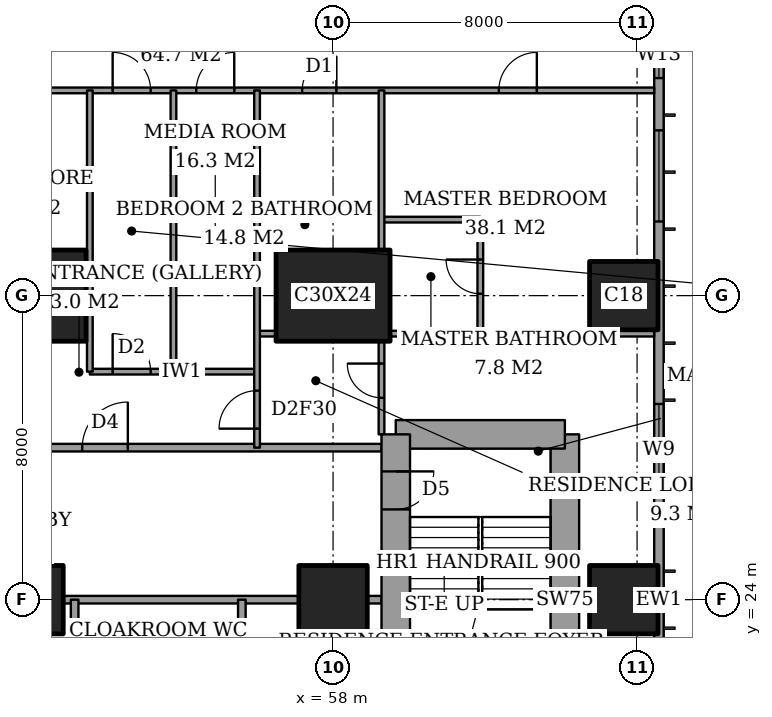
"""IFC4 building model, lengths in metres.
Left out: names, types, materials, properties, quantities, classifications, styles, units other than length and angle.
Written with IfcOpenShell. Run it as: python <this file> out.ifc"""

import sys

from ifc_helpers import new_model, si_unit, direction, frame, frame_2d, origin, origin_2d, place, context, subcontext, project, spatial, rectangle, extrude, element, fill, save


model = new_model("IFC4")
c1 = context("Model", 3, precision=1e-05, world=origin(), true_north=direction((0.0, 1.0)))
c2 = subcontext(c1, "Body", "Model", "MODEL_VIEW")
j1 = project(units=[si_unit("LENGTHUNIT", "METRE"), si_unit("PLANEANGLEUNIT", "RADIAN")], contexts=[c1])
p1 = place(None, origin())
s1 = spatial("IfcSite", under=j1, at=p1, CompositionType="ELEMENT")
p2 = place(p1, origin())
s2 = spatial("IfcBuilding", under=s1, at=p2, CompositionType="ELEMENT")
p3 = place(p2, frame((0.0, 0.0, 189.4)))
s3 = spatial("IfcBuildingStorey", under=s2, at=p3, CompositionType="ELEMENT", Elevation=189.4)
p4 = place(p3, frame((50.0, 24.0, 0.0), z_axis=(0.0, 0.0, 1.0), x_axis=(1.0, 0.0, 0.0)))
e1 = element("IfcColumn", 1, at=p4, inside=s3, PredefinedType="COLUMN", context=c2, shape_type="SweptSolid", body=[
    extrude(rectangle(XDim=1.8, YDim=1.8, at=origin_2d()), origin(), (0.0, 0.0, 1.0), 3.6),
])
p5 = place(p3, frame((50.0, 32.0, 0.0), z_axis=(0.0, 0.0, 1.0), x_axis=(1.0, 0.0, 0.0)))
e2 = element("IfcColumn", 2, at=p5, inside=s3, PredefinedType="COLUMN", context=c2, shape_type="SweptSolid", body=[
    extrude(rectangle(XDim=3.0, YDim=2.4, at=origin_2d()), origin(), (0.0, 0.0, 1.0), 3.6),
])
p6 = place(p3, frame((58.0, 24.0, 0.0), z_axis=(0.0, 0.0, 1.0), x_axis=(1.0, 0.0, 0.0)))
e3 = element("IfcColumn", 3, at=p6, inside=s3, PredefinedType="COLUMN", context=c2, shape_type="SweptSolid", body=[
    extrude(rectangle(XDim=1.8, YDim=1.8, at=origin_2d()), origin(), (0.0, 0.0, 1.0), 3.6),
])
p7 = place(p3, frame((58.0, 32.0, 0.0), z_axis=(0.0, 0.0, 1.0), x_axis=(1.0, 0.0, 0.0)))
e4 = element("IfcColumn", 4, at=p7, inside=s3, PredefinedType="COLUMN", context=c2, shape_type="SweptSolid", body=[
    extrude(rectangle(XDim=3.0, YDim=2.4, at=origin_2d()), origin(), (0.0, 0.0, 1.0), 3.6),
])
for number, where, z_axis, x_axis in (
    (5, (65.65, 24.0, 0.0), (0.0, 0.0, 1.0), (1.0, 0.0, 0.0)),
    (6, (65.65, 32.0, 0.0), (0.0, 0.0, 1.0), (1.0, 0.0, 0.0)),
):
    element("IfcColumn", number, at=place(p3, frame(where, z_axis=z_axis, x_axis=x_axis)), inside=s3, PredefinedType="COLUMN", context=c2, shape_type="SweptSolid", body=[
        extrude(rectangle(XDim=1.8, YDim=1.8, at=origin_2d()), origin(), (0.0, 0.0, 1.0), 3.6),
    ])
p8 = place(p3, frame((64.1, 19.65, 0.0), z_axis=(0.0, 0.0, 1.0), x_axis=(0.0, 1.0, 0.0)))
e7 = element("IfcWall", 7, at=p8, inside=s3, PredefinedType="SHEAR", context=c2, shape_type="SweptSolid", body=[
    extrude(rectangle(XDim=8.7, YDim=0.75, at=frame_2d((4.35, 0.0))), origin(), (0.0, 0.0, 1.0), 3.6),
])
p9 = place(p3, frame((64.1, 28.35, 0.0), z_axis=(0.0, 0.0, 1.0), x_axis=(-1.0, 0.0, 0.0)))
e8 = element("IfcWall", 8, at=p9, inside=s3, PredefinedType="SHEAR", context=c2, shape_type="SweptSolid", body=[
    extrude(rectangle(XDim=4.45, YDim=0.75, at=frame_2d((2.225, 0.0))), origin(), (0.0, 0.0, 1.0), 3.6),
])
p10 = place(p3, frame((59.65, 28.35, 0.0), z_axis=(0.0, 0.0, 1.0), x_axis=(0.0, -1.0, 0.0)))
e9 = element("IfcWall", 9, at=p10, inside=s3, PredefinedType="SHEAR", context=c2, shape_type="SweptSolid", body=[
    extrude(rectangle(XDim=8.7, YDim=0.75, at=frame_2d((4.35, 0.0))), origin(), (0.0, 0.0, 1.0), 3.6),
])
p11 = place(p10, frame((0.975, 0.0, 0.0)))
e10 = element("IfcOpeningElement", 10, at=p11, cuts=e9, PredefinedType="OPENING", context=c2, shape_type="SweptSolid", body=[
    extrude(rectangle(XDim=1.0, YDim=2.1, at=frame_2d((0.5, 1.05))), frame((0.0, 0.385, 0.0), z_axis=(0.0, -1.0, 0.0), x_axis=(1.0, 0.0, 0.0)), (0.0, 0.0, 1.0), 0.77),
])
p12 = place(p3, frame((66.575, 3.175, 0.0), z_axis=(0.0, 0.0, 1.0), x_axis=(0.0, 1.0, 0.0)))
e11 = element("IfcWall", 11, at=p12, inside=s3, PredefinedType="SOLIDWALL", context=c2, shape_type="SweptSolid", body=[
    extrude(rectangle(XDim=41.65, YDim=0.25, at=frame_2d((20.825, 0.0))), origin(), (0.0, 0.0, 1.0), 3.6),
])
p13 = place(p12, frame((0.825, 0.0, 0.2)))
e12 = element("IfcOpeningElement", 12, at=p13, cuts=e11, PredefinedType="OPENING", context=c2, shape_type="SweptSolid", body=[
    extrude(rectangle(XDim=2.4, YDim=2.4, at=frame_2d((1.2, 1.2))), frame((0.0, 0.135, 0.0), z_axis=(0.0, -1.0, 0.0), x_axis=(1.0, 0.0, 0.0)), (0.0, 0.0, 1.0), 0.27),
])
p14 = place(p12, frame((6.6, 0.0, 0.2)))
e13 = element("IfcOpeningElement", 13, at=p14, cuts=e11, PredefinedType="OPENING", context=c2, shape_type="SweptSolid", body=[
    extrude(rectangle(XDim=1.2, YDim=2.4, at=frame_2d((0.6, 1.2))), frame((0.0, 0.135, 0.0), z_axis=(0.0, -1.0, 0.0), x_axis=(1.0, 0.0, 0.0)), (0.0, 0.0, 1.0), 0.27),
])
p15 = place(p12, frame((8.775, 0.0, 0.2)))
e14 = element("IfcOpeningElement", 14, at=p15, cuts=e11, PredefinedType="OPENING", context=c2, shape_type="SweptSolid", body=[
    extrude(rectangle(XDim=2.4, YDim=2.4, at=frame_2d((1.2, 1.2))), frame((0.0, 0.135, 0.0), z_axis=(0.0, -1.0, 0.0), x_axis=(1.0, 0.0, 0.0)), (0.0, 0.0, 1.0), 0.27),
])
p16 = place(p12, frame((15.675, 0.0, 0.2)))
e15 = element("IfcOpeningElement", 15, at=p16, cuts=e11, PredefinedType="OPENING", context=c2, shape_type="SweptSolid", body=[
    extrude(rectangle(XDim=2.4, YDim=2.4, at=frame_2d((1.2, 1.2))), frame((0.0, 0.135, 0.0), z_axis=(0.0, -1.0, 0.0), x_axis=(1.0, 0.0, 0.0)), (0.0, 0.0, 1.0), 0.27),
])
p17 = place(p12, frame((23.575, 0.0, 0.2)))
e16 = element("IfcOpeningElement", 16, at=p17, cuts=e11, PredefinedType="OPENING", context=c2, shape_type="SweptSolid", body=[
    extrude(rectangle(XDim=2.4, YDim=2.4, at=frame_2d((1.2, 1.2))), frame((0.0, 0.135, 0.0), z_axis=(0.0, -1.0, 0.0), x_axis=(1.0, 0.0, 0.0)), (0.0, 0.0, 1.0), 0.27),
])
p18 = place(p12, frame((30.775, 0.0, 0.2)))
e17 = element("IfcOpeningElement", 17, at=p18, cuts=e11, PredefinedType="OPENING", context=c2, shape_type="SweptSolid", body=[
    extrude(rectangle(XDim=2.4, YDim=2.4, at=frame_2d((1.2, 1.2))), frame((0.0, 0.135, 0.0), z_axis=(0.0, -1.0, 0.0), x_axis=(1.0, 0.0, 0.0)), (0.0, 0.0, 1.0), 0.27),
])
p19 = place(p12, frame((34.55, 0.0, 0.2)))
e18 = element("IfcOpeningElement", 18, at=p19, cuts=e11, PredefinedType="OPENING", context=c2, shape_type="SweptSolid", body=[
    extrude(rectangle(XDim=1.2, YDim=2.4, at=frame_2d((0.6, 1.2))), frame((0.0, 0.135, 0.0), z_axis=(0.0, -1.0, 0.0), x_axis=(1.0, 0.0, 0.0)), (0.0, 0.0, 1.0), 0.27),
])
p20 = place(p12, frame((38.425, 0.0, 0.2)))
e19 = element("IfcOpeningElement", 19, at=p20, cuts=e11, PredefinedType="OPENING", context=c2, shape_type="SweptSolid", body=[
    extrude(rectangle(XDim=2.4, YDim=2.4, at=frame_2d((1.2, 1.2))), frame((0.0, 0.135, 0.0), z_axis=(0.0, -1.0, 0.0), x_axis=(1.0, 0.0, 0.0)), (0.0, 0.0, 1.0), 0.27),
])
p21 = place(p3, frame((50.9, 24.0, 0.0), z_axis=(0.0, 0.0, 1.0), x_axis=(1.0, 0.0, 0.0)))
e20 = element("IfcWall", 20, at=p21, inside=s3, PredefinedType="PARTITIONING", context=c2, shape_type="SweptSolid", body=[
    extrude(rectangle(XDim=6.2, YDim=0.2, at=frame_2d((3.1, 0.0))), origin(), (0.0, 0.0, 1.0), 3.35),
])
p22 = place(p3, frame((58.9, 24.0, 0.0), z_axis=(0.0, 0.0, 1.0), x_axis=(1.0, 0.0, 0.0)))
e21 = element("IfcWall", 21, at=p22, inside=s3, PredefinedType="PARTITIONING", context=c2, shape_type="SweptSolid", body=[
    extrude(rectangle(XDim=0.375, YDim=0.2, at=frame_2d((0.188, 0.0))), origin(), (0.0, 0.0, 1.0), 3.35),
])
p23 = place(p3, frame((42.0, 28.0, 0.0), z_axis=(0.0, 0.0, 1.0), x_axis=(1.0, 0.0, 0.0)))
e22 = element("IfcWall", 22, at=p23, inside=s3, PredefinedType="PARTITIONING", context=c2, shape_type="SweptSolid", body=[
    extrude(rectangle(XDim=17.275, YDim=0.2, at=frame_2d((8.637, 0.0))), origin(), (0.0, 0.0, 1.0), 3.35),
])
p24 = place(p23, frame((9.4, 0.0, 0.0)))
e23 = element("IfcOpeningElement", 23, at=p24, cuts=e22, PredefinedType="OPENING", context=c2, shape_type="SweptSolid", body=[
    extrude(rectangle(XDim=1.2, YDim=2.4, at=frame_2d((0.6, 1.2))), frame((0.0, 0.11, 0.0), z_axis=(0.0, -1.0, 0.0), x_axis=(1.0, 0.0, 0.0)), (0.0, 0.0, 1.0), 0.22),
])
p25 = place(p3, frame((51.6, 30.0, 0.0), z_axis=(0.0, 0.0, 1.0), x_axis=(1.0, 0.0, 0.0)))
e24 = element("IfcWall", 24, at=p25, inside=s3, PredefinedType="PARTITIONING", context=c2, shape_type="SweptSolid", body=[
    extrude(rectangle(XDim=4.4, YDim=0.15, at=frame_2d((2.2, 0.0))), origin(), (0.0, 0.0, 1.0), 3.35),
])
p26 = place(p25, frame((0.6, 0.0, 0.0)))
e25 = element("IfcOpeningElement", 25, at=p26, cuts=e24, PredefinedType="OPENING", context=c2, shape_type="SweptSolid", body=[
    extrude(rectangle(XDim=1.0, YDim=2.1, at=frame_2d((0.5, 1.05))), frame((0.0, 0.085, 0.0), z_axis=(0.0, -1.0, 0.0), x_axis=(1.0, 0.0, 0.0)), (0.0, 0.0, 1.0), 0.17),
])
p27 = place(p3, frame((56.0, 31.0, 0.0), z_axis=(0.0, 0.0, 1.0), x_axis=(1.0, 0.0, 0.0)))
e26 = element("IfcWall", 26, at=p27, inside=s3, PredefinedType="PARTITIONING", context=c2, shape_type="SweptSolid", body=[
    extrude(rectangle(XDim=0.5, YDim=0.15, at=frame_2d((0.25, 0.0))), origin(), (0.0, 0.0, 1.0), 3.35),
])
p28 = place(p3, frame((59.5, 31.0, 0.0), z_axis=(0.0, 0.0, 1.0), x_axis=(1.0, 0.0, 0.0)))
e27 = element("IfcWall", 27, at=p28, inside=s3, PredefinedType="PARTITIONING", context=c2, shape_type="SweptSolid", body=[
    extrude(rectangle(XDim=6.95, YDim=0.15, at=frame_2d((3.475, 0.0))), origin(), (0.0, 0.0, 1.0), 3.35),
])
p29 = place(p3, frame((59.275, 34.0, 0.0), z_axis=(0.0, 0.0, 1.0), x_axis=(1.0, 0.0, 0.0)))
e28 = element("IfcWall", 28, at=p29, inside=s3, PredefinedType="PARTITIONING", context=c2, shape_type="SweptSolid", body=[
    extrude(rectangle(XDim=2.6, YDim=0.15, at=frame_2d((1.3, 0.0))), origin(), (0.0, 0.0, 1.0), 3.35),
])
p30 = place(p3, frame((41.439, 37.4, 0.0), z_axis=(0.0, 0.0, 1.0), x_axis=(1.0, 0.0, 0.0)))
e29 = element("IfcWall", 29, at=p30, inside=s3, PredefinedType="PARTITIONING", context=c2, shape_type="SweptSolid", body=[
    extrude(rectangle(XDim=25.011, YDim=0.15, at=frame_2d((12.505, 0.0))), origin(), (0.0, 0.0, 1.0), 3.35),
])
p31 = place(p30, frame((10.761, 0.0, 0.0)))
e30 = element("IfcOpeningElement", 30, at=p31, cuts=e29, PredefinedType="OPENING", context=c2, shape_type="SweptSolid", body=[
    extrude(rectangle(XDim=1.0, YDim=2.1, at=frame_2d((0.5, 1.05))), frame((0.0, 0.085, 0.0), z_axis=(0.0, -1.0, 0.0), x_axis=(1.0, 0.0, 0.0)), (0.0, 0.0, 1.0), 0.17),
])
p32 = place(p30, frame((20.924, 0.0, 0.0)))
e31 = element("IfcOpeningElement", 31, at=p32, cuts=e29, PredefinedType="OPENING", context=c2, shape_type="SweptSolid", body=[
    extrude(rectangle(XDim=1.0, YDim=2.1, at=frame_2d((0.5, 1.05))), frame((0.0, 0.085, 0.0), z_axis=(0.0, -1.0, 0.0), x_axis=(1.0, 0.0, 0.0)), (0.0, 0.0, 1.0), 0.17),
])
p33 = place(p30, frame((15.749, 0.0, 0.0)))
e32 = element("IfcOpeningElement", 32, at=p33, cuts=e29, PredefinedType="OPENING", context=c2, shape_type="SweptSolid", body=[
    extrude(rectangle(XDim=0.9, YDim=2.1, at=frame_2d((0.45, 1.05))), frame((0.0, 0.085, 0.0), z_axis=(0.0, -1.0, 0.0), x_axis=(1.0, 0.0, 0.0)), (0.0, 0.0, 1.0), 0.17),
])
p34 = place(p30, frame((12.961, 0.0, 0.0)))
e33 = element("IfcOpeningElement", 33, at=p34, cuts=e29, PredefinedType="OPENING", context=c2, shape_type="SweptSolid", body=[
    extrude(rectangle(XDim=1.0, YDim=2.1, at=frame_2d((0.5, 1.05))), frame((0.0, 0.085, 0.0), z_axis=(0.0, -1.0, 0.0), x_axis=(1.0, 0.0, 0.0)), (0.0, 0.0, 1.0), 0.17),
])
p35 = place(p30, frame((7.911, 0.0, 0.0)))
e34 = element("IfcOpeningElement", 34, at=p35, cuts=e29, PredefinedType="OPENING", context=c2, shape_type="SweptSolid", body=[
    extrude(rectangle(XDim=0.9, YDim=2.1, at=frame_2d((0.45, 1.05))), frame((0.0, 0.085, 0.0), z_axis=(0.0, -1.0, 0.0), x_axis=(1.0, 0.0, 0.0)), (0.0, 0.0, 1.0), 0.17),
])
p36 = place(p30, frame((2.836, 0.0, 0.0)))
e35 = element("IfcOpeningElement", 35, at=p36, cuts=e29, PredefinedType="OPENING", context=c2, shape_type="SweptSolid", body=[
    extrude(rectangle(XDim=1.0, YDim=2.1, at=frame_2d((0.5, 1.05))), frame((0.0, 0.085, 0.0), z_axis=(0.0, -1.0, 0.0), x_axis=(1.0, 0.0, 0.0)), (0.0, 0.0, 1.0), 0.17),
])
p37 = place(p3, frame((51.2, 21.6, 0.0), z_axis=(0.0, 0.0, 1.0), x_axis=(0.0, 1.0, 0.0)))
e36 = element("IfcWall", 36, at=p37, inside=s3, PredefinedType="PARTITIONING", context=c2, shape_type="SweptSolid", body=[
    extrude(rectangle(XDim=2.4, YDim=0.2, at=frame_2d((1.2, 0.0))), origin(), (0.0, 0.0, 1.0), 3.35),
])
for number, where, z_axis, x_axis in (
    (37, (51.6, 30.0, 0.0), (0.0, 0.0, 1.0), (0.0, 1.0, 0.0)),
    (38, (53.8, 30.0, 0.0), (0.0, 0.0, 1.0), (0.0, 1.0, 0.0)),
):
    element("IfcWall", number, at=place(p3, frame(where, z_axis=z_axis, x_axis=x_axis)), inside=s3, PredefinedType="PARTITIONING", context=c2, shape_type="SweptSolid", body=[
        extrude(rectangle(XDim=7.4, YDim=0.15, at=frame_2d((3.7, 0.0))), origin(), (0.0, 0.0, 1.0), 3.35),
    ])
p38 = place(p3, frame((55.6, 21.6, 0.0), z_axis=(0.0, 0.0, 1.0), x_axis=(0.0, 1.0, 0.0)))
e39 = element("IfcWall", 39, at=p38, inside=s3, PredefinedType="PARTITIONING", context=c2, shape_type="SweptSolid", body=[
    extrude(rectangle(XDim=2.4, YDim=0.2, at=frame_2d((1.2, 0.0))), origin(), (0.0, 0.0, 1.0), 3.35),
])
p39 = place(p3, frame((56.0, 28.0, 0.0), z_axis=(0.0, 0.0, 1.0), x_axis=(0.0, 1.0, 0.0)))
e40 = element("IfcWall", 40, at=p39, inside=s3, PredefinedType="PARTITIONING", context=c2, shape_type="SweptSolid", body=[
    extrude(rectangle(XDim=9.4, YDim=0.15, at=frame_2d((4.7, 0.0))), origin(), (0.0, 0.0, 1.0), 3.35),
])
p40 = place(p39, frame((0.5, 0.0, 0.0)))
e41 = element("IfcOpeningElement", 41, at=p40, cuts=e40, PredefinedType="OPENING", context=c2, shape_type="SweptSolid", body=[
    extrude(rectangle(XDim=1.0, YDim=2.1, at=frame_2d((0.5, 1.05))), frame((0.0, 0.085, 0.0), z_axis=(0.0, -1.0, 0.0), x_axis=(1.0, 0.0, 0.0)), (0.0, 0.0, 1.0), 0.17),
])
p41 = place(p3, frame((59.275, 28.35, 0.0), z_axis=(0.0, 0.0, 1.0), x_axis=(0.0, 1.0, 0.0)))
e42 = element("IfcWall", 42, at=p41, inside=s3, PredefinedType="PARTITIONING", context=c2, shape_type="SweptSolid", body=[
    extrude(rectangle(XDim=2.45, YDim=0.15, at=frame_2d((1.225, 0.0))), origin(), (0.0, 0.0, 1.0), 3.35),
])
p42 = place(p41, frame((0.962, 0.0, 0.0)))
e43 = element("IfcOpeningElement", 43, at=p42, cuts=e42, PredefinedType="OPENING", context=c2, shape_type="SweptSolid", body=[
    extrude(rectangle(XDim=0.9, YDim=2.1, at=frame_2d((0.45, 1.05))), frame((0.0, 0.085, 0.0), z_axis=(0.0, -1.0, 0.0), x_axis=(1.0, 0.0, 0.0)), (0.0, 0.0, 1.0), 0.17),
])
p43 = place(p3, frame((59.275, 33.2, 0.0), z_axis=(0.0, 0.0, 1.0), x_axis=(0.0, 1.0, 0.0)))
e44 = element("IfcWall", 44, at=p43, inside=s3, PredefinedType="PARTITIONING", context=c2, shape_type="SweptSolid", body=[
    extrude(rectangle(XDim=4.2, YDim=0.15, at=frame_2d((2.1, 0.0))), origin(), (0.0, 0.0, 1.0), 3.35),
])
p44 = place(p3, frame((61.875, 31.0, 0.0), z_axis=(0.0, 0.0, 1.0), x_axis=(0.0, 1.0, 0.0)))
e45 = element("IfcWall", 45, at=p44, inside=s3, PredefinedType="PARTITIONING", context=c2, shape_type="SweptSolid", body=[
    extrude(rectangle(XDim=3.0, YDim=0.15, at=frame_2d((1.5, 0.0))), origin(), (0.0, 0.0, 1.0), 3.35),
])
p45 = place(p44, frame((1.05, 0.0, 0.0)))
e46 = element("IfcOpeningElement", 46, at=p45, cuts=e45, PredefinedType="OPENING", context=c2, shape_type="SweptSolid", body=[
    extrude(rectangle(XDim=0.9, YDim=2.1, at=frame_2d((0.45, 1.05))), frame((0.0, 0.085, 0.0), z_axis=(0.0, -1.0, 0.0), x_axis=(1.0, 0.0, 0.0)), (0.0, 0.0, 1.0), 0.17),
])
p46 = place(p17, origin())
e47 = element("IfcWindow", 47, at=p46, inside=s3, PartitioningType="SINGLE_PANEL", PredefinedType="WINDOW", context=c2, shape_type="SweptSolid", body=[
    extrude(rectangle(XDim=2.4, YDim=2.4, at=frame_2d((1.2, 1.2))), frame((0.0, 0.03, 0.0), z_axis=(0.0, -1.0, 0.0), x_axis=(1.0, 0.0, 0.0)), (0.0, 0.0, 1.0), 0.06),
])
fill(e16, e47)
p47 = place(p18, origin())
e48 = element("IfcWindow", 48, at=p47, inside=s3, PartitioningType="SINGLE_PANEL", PredefinedType="WINDOW", context=c2, shape_type="SweptSolid", body=[
    extrude(rectangle(XDim=2.4, YDim=2.4, at=frame_2d((1.2, 1.2))), frame((0.0, 0.03, 0.0), z_axis=(0.0, -1.0, 0.0), x_axis=(1.0, 0.0, 0.0)), (0.0, 0.0, 1.0), 0.06),
])
fill(e17, e48)
p48 = place(p19, origin())
e49 = element("IfcWindow", 49, at=p48, inside=s3, PartitioningType="SINGLE_PANEL", PredefinedType="WINDOW", context=c2, shape_type="SweptSolid", body=[
    extrude(rectangle(XDim=1.2, YDim=2.4, at=frame_2d((0.6, 1.2))), frame((0.0, 0.03, 0.0), z_axis=(0.0, -1.0, 0.0), x_axis=(1.0, 0.0, 0.0)), (0.0, 0.0, 1.0), 0.06),
])
fill(e18, e49)
p49 = place(p31, origin())
e50 = element("IfcDoor", 50, at=p49, inside=s3, OperationType="SINGLE_SWING_RIGHT", PredefinedType="DOOR", context=c2, shape_type="SweptSolid", body=[
    extrude(rectangle(XDim=1.0, YDim=2.1, at=frame_2d((0.5, 1.05))), frame((0.0, 0.025, 0.0), z_axis=(0.0, -1.0, 0.0), x_axis=(1.0, 0.0, 0.0)), (0.0, 0.0, 1.0), 0.05),
])
fill(e30, e50)
p50 = place(p45, origin())
e51 = element("IfcDoor", 51, at=p50, inside=s3, OperationType="SINGLE_SWING_LEFT", PredefinedType="DOOR", context=c2, shape_type="SweptSolid", body=[
    extrude(rectangle(XDim=0.9, YDim=2.1, at=frame_2d((0.45, 1.05))), frame((0.0, 0.025, 0.0), z_axis=(0.0, -1.0, 0.0), x_axis=(1.0, 0.0, 0.0)), (0.0, 0.0, 1.0), 0.05),
])
fill(e46, e51)
p51 = place(p32, origin())
e52 = element("IfcDoor", 52, at=p51, inside=s3, OperationType="SINGLE_SWING_LEFT", PredefinedType="DOOR", context=c2, shape_type="SweptSolid", body=[
    extrude(rectangle(XDim=1.0, YDim=2.1, at=frame_2d((0.5, 1.05))), frame((0.0, 0.025, 0.0), z_axis=(0.0, -1.0, 0.0), x_axis=(1.0, 0.0, 0.0)), (0.0, 0.0, 1.0), 0.05),
])
fill(e31, e52)
p52 = place(p42, origin())
e53 = element("IfcDoor", 53, at=p52, inside=s3, OperationType="SINGLE_SWING_LEFT", PredefinedType="DOOR", context=c2, shape_type="SweptSolid", body=[
    extrude(rectangle(XDim=0.9, YDim=2.1, at=frame_2d((0.45, 1.05))), frame((0.0, 0.025, 0.0), z_axis=(0.0, -1.0, 0.0), x_axis=(1.0, 0.0, 0.0)), (0.0, 0.0, 1.0), 0.05),
])
fill(e43, e53)
p53 = place(p33, origin())
e54 = element("IfcDoor", 54, at=p53, inside=s3, OperationType="SINGLE_SWING_LEFT", PredefinedType="DOOR", context=c2, shape_type="SweptSolid", body=[
    extrude(rectangle(XDim=0.9, YDim=2.1, at=frame_2d((0.45, 1.05))), frame((0.0, 0.025, 0.0), z_axis=(0.0, -1.0, 0.0), x_axis=(1.0, 0.0, 0.0)), (0.0, 0.0, 1.0), 0.05),
])
fill(e32, e54)
p54 = place(p40, origin())
e55 = element("IfcDoor", 55, at=p54, inside=s3, OperationType="SINGLE_SWING_RIGHT", PredefinedType="DOOR", context=c2, shape_type="SweptSolid", body=[
    extrude(rectangle(XDim=1.0, YDim=2.1, at=frame_2d((0.5, 1.05))), frame((0.0, 0.025, 0.0), z_axis=(0.0, -1.0, 0.0), x_axis=(1.0, 0.0, 0.0)), (0.0, 0.0, 1.0), 0.05),
])
fill(e41, e55)
p55 = place(p24, origin())
e56 = element("IfcDoor", 56, at=p55, inside=s3, OperationType="SINGLE_SWING_LEFT", PredefinedType="DOOR", context=c2, shape_type="SweptSolid", body=[
    extrude(rectangle(XDim=1.2, YDim=2.4, at=frame_2d((0.6, 1.2))), frame((0.0, 0.025, 0.0), z_axis=(0.0, -1.0, 0.0), x_axis=(1.0, 0.0, 0.0)), (0.0, 0.0, 1.0), 0.05),
])
fill(e23, e56)
p56 = place(p34, origin())
e57 = element("IfcDoor", 57, at=p56, inside=s3, OperationType="SINGLE_SWING_LEFT", PredefinedType="DOOR", context=c2, shape_type="SweptSolid", body=[
    extrude(rectangle(XDim=1.0, YDim=2.1, at=frame_2d((0.5, 1.05))), frame((0.0, 0.025, 0.0), z_axis=(0.0, -1.0, 0.0), x_axis=(1.0, 0.0, 0.0)), (0.0, 0.0, 1.0), 0.05),
])
fill(e33, e57)
p57 = place(p26, origin())
e58 = element("IfcDoor", 58, at=p57, inside=s3, OperationType="SINGLE_SWING_RIGHT", PredefinedType="DOOR", context=c2, shape_type="SweptSolid", body=[
    extrude(rectangle(XDim=1.0, YDim=2.1, at=frame_2d((0.5, 1.05))), frame((0.0, 0.025, 0.0), z_axis=(0.0, -1.0, 0.0), x_axis=(1.0, 0.0, 0.0)), (0.0, 0.0, 1.0), 0.05),
])
fill(e25, e58)
p58 = place(p11, origin())
e59 = element("IfcDoor", 59, at=p58, inside=s3, OperationType="SINGLE_SWING_RIGHT", PredefinedType="DOOR", context=c2, shape_type="SweptSolid", body=[
    extrude(rectangle(XDim=1.0, YDim=2.1, at=frame_2d((0.5, 1.05))), frame((0.0, 0.025, 0.0), z_axis=(0.0, -1.0, 0.0), x_axis=(1.0, 0.0, 0.0)), (0.0, 0.0, 1.0), 0.05),
])
fill(e10, e59)
save(model, sys.argv[1])
